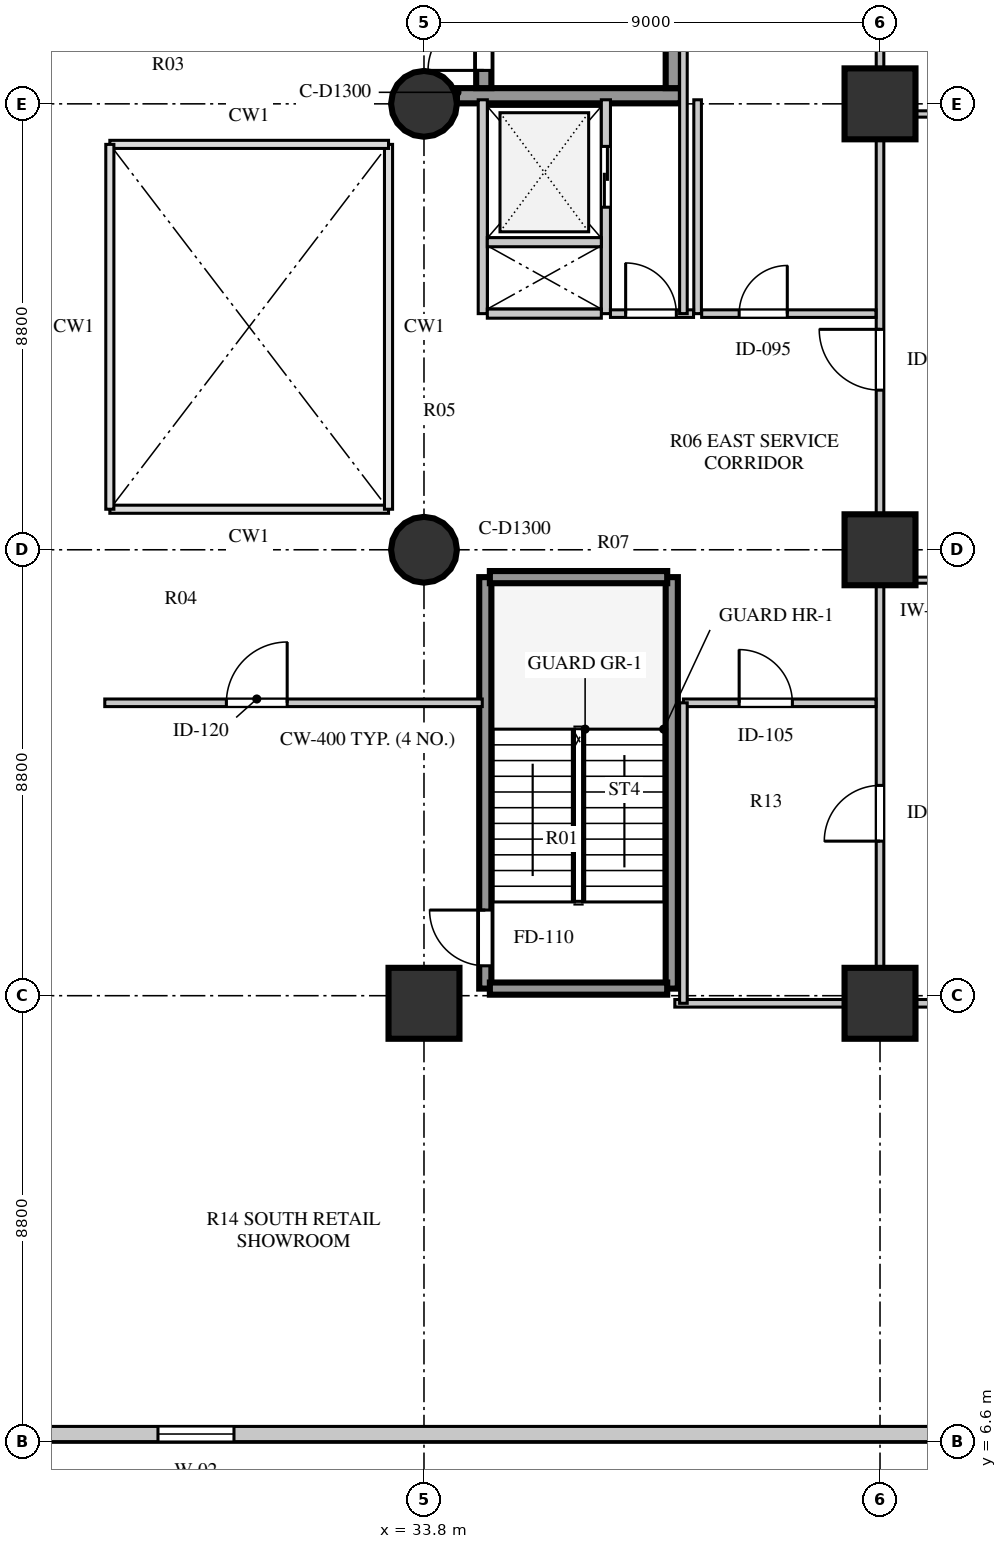
"""IFC4 building model, lengths in metres.
Left out: names, types, materials, properties, quantities, classifications, styles, units other than length and angle.
Written with IfcOpenShell. Run it as: python <this file> out.ifc"""

import sys

from ifc_helpers import new_model, si_unit, direction, frame, frame_2d, origin, origin_2d, place, context, subcontext, project, spatial, rectangle, circle, extrude, element, fill, save


model = new_model("IFC4")
c1 = context("Model", 3, precision=1e-05, world=origin(), true_north=direction((0.0, 1.0)))
c2 = subcontext(c1, "Body", "Model", "MODEL_VIEW")
j1 = project(units=[si_unit("LENGTHUNIT", "METRE"), si_unit("PLANEANGLEUNIT", "RADIAN")], contexts=[c1])
p1 = place(None, origin())
s1 = spatial("IfcSite", under=j1, at=p1, CompositionType="ELEMENT")
p2 = place(p1, origin())
s2 = spatial("IfcBuilding", under=s1, at=p2, CompositionType="ELEMENT")
p3 = place(p2, frame((0.0, 0.0, 8.0)))
s3 = spatial("IfcBuildingStorey", under=s2, at=p3, CompositionType="ELEMENT", Elevation=8.0)
p4 = place(p3, frame((34.45, 33.16, 0.0), z_axis=(0.0, 0.0, 1.0), x_axis=(1.0, 0.0, 0.0)))
e1 = element("IfcWall", 1, at=p4, inside=s3, PredefinedType="SHEAR", context=c2, shape_type="SweptSolid", body=[
    extrude(rectangle(XDim=4.42, YDim=0.3, at=frame_2d((2.21, 0.0))), origin(), (0.0, 0.0, 1.0), 4.22),
])
p5 = place(p3, frame((34.98, 33.31, 0.0), z_axis=(0.0, 0.0, 1.0), x_axis=(0.0, 1.0, 0.0)))
e2 = element("IfcWall", 2, at=p5, inside=s3, PredefinedType="SHEAR", context=c2, shape_type="SweptSolid", body=[
    extrude(rectangle(XDim=8.03, YDim=0.3, at=frame_2d((4.015, 0.0))), origin(), (0.0, 0.0, 1.0), 4.22),
])
p6 = place(p5, frame((0.35, 0.0, 0.0)))
e3 = element("IfcOpeningElement", 3, at=p6, cuts=e2, PredefinedType="OPENING", context=c2, shape_type="SweptSolid", body=[
    extrude(rectangle(XDim=1.1, YDim=2.1, at=frame_2d((0.55, 1.05))), frame((0.0, 0.16, 0.0), z_axis=(0.0, -1.0, 0.0), x_axis=(1.0, 0.0, 0.0)), (0.0, 0.0, 1.0), 0.32),
])
p7 = place(p3, frame((38.72, 33.31, 0.0), z_axis=(0.0, 0.0, 1.0), x_axis=(0.0, 1.0, 0.0)))
e4 = element("IfcWall", 4, at=p7, inside=s3, PredefinedType="SHEAR", context=c2, shape_type="SweptSolid", body=[
    extrude(rectangle(XDim=8.03, YDim=0.3, at=frame_2d((4.015, 0.0))), origin(), (0.0, 0.0, 1.0), 4.22),
])
p8 = place(p3, frame((33.8, 15.25, 0.0), z_axis=(0.0, 0.0, 1.0), x_axis=(1.0, 0.0, 0.0)))
e5 = element("IfcColumn", 5, at=p8, inside=s3, PredefinedType="COLUMN", context=c2, shape_type="SweptSolid", body=[
    extrude(rectangle(XDim=1.4, YDim=1.4, at=origin_2d()), origin(), (0.0, 0.0, 1.0), 4.22),
])
for number, where, z_axis, x_axis in (
    (6, (33.8, 24.2, 0.0), (0.0, 0.0, 1.0), (1.0, 0.0, 0.0)),
    (7, (33.8, 33.0, 0.0), (0.0, 0.0, 1.0), (1.0, 0.0, 0.0)),
):
    element("IfcColumn", number, at=place(p3, frame(where, z_axis=z_axis, x_axis=x_axis)), inside=s3, PredefinedType="COLUMN", context=c2, shape_type="SweptSolid", body=[
        extrude(circle(Radius=0.65, at=origin_2d()), origin(), (0.0, 0.0, 1.0), 4.22),
    ])
for number, where, z_axis, x_axis in (
    (8, (42.8, 15.25, 0.0), (0.0, 0.0, 1.0), (1.0, 0.0, 0.0)),
    (9, (42.8, 24.2, 0.0), (0.0, 0.0, 1.0), (1.0, 0.0, 0.0)),
    (10, (42.8, 33.0, 0.0), (0.0, 0.0, 1.0), (1.0, 0.0, 0.0)),
):
    element("IfcColumn", number, at=place(p3, frame(where, z_axis=z_axis, x_axis=x_axis)), inside=s3, PredefinedType="COLUMN", context=c2, shape_type="SweptSolid", body=[
        extrude(rectangle(XDim=1.4, YDim=1.4, at=origin_2d()), origin(), (0.0, 0.0, 1.0), 4.22),
    ])
p9 = place(p3, frame((12.3, 6.75, 0.0), z_axis=(0.0, 0.0, 1.0), x_axis=(1.0, 0.0, 0.0)))
e11 = element("IfcWall", 11, at=p9, inside=s3, PredefinedType="STANDARD", context=c2, shape_type="SweptSolid", body=[
    extrude(rectangle(XDim=34.0, YDim=0.3, at=frame_2d((17.0, 0.0))), origin(), (0.0, 0.0, 1.0), 4.22),
])
p10 = place(p9, frame((16.25, 0.0, 0.8)))
e12 = element("IfcOpeningElement", 12, at=p10, cuts=e11, PredefinedType="OPENING", context=c2, shape_type="SweptSolid", body=[
    extrude(rectangle(XDim=1.5, YDim=2.0, at=frame_2d((0.75, 1.0))), frame((0.0, 0.16, 0.0), z_axis=(0.0, -1.0, 0.0), x_axis=(1.0, 0.0, 0.0)), (0.0, 0.0, 1.0), 0.32),
])
p11 = place(p3, frame((34.96, 28.86, 0.0), z_axis=(0.0, 0.0, 1.0), x_axis=(0.0, 1.0, 0.0)))
e13 = element("IfcWall", 13, at=p11, inside=s3, PredefinedType="SOLIDWALL", context=c2, shape_type="SweptSolid", body=[
    extrude(rectangle(XDim=4.22, YDim=0.18, at=frame_2d((2.11, 0.0))), origin(), (0.0, 0.0, 1.0), 4.22),
])
p12 = place(p3, frame((37.39, 28.86, 0.0), z_axis=(0.0, 0.0, 1.0), x_axis=(0.0, 1.0, 0.0)))
e14 = element("IfcWall", 14, at=p12, inside=s3, PredefinedType="SOLIDWALL", context=c2, shape_type="SweptSolid", body=[
    extrude(rectangle(XDim=4.22, YDim=0.18, at=frame_2d((2.11, 0.0))), origin(), (0.0, 0.0, 1.0), 4.22),
])
p13 = place(p12, frame((2.1, 0.0, 0.0)))
e15 = element("IfcOpeningElement", 15, at=p13, cuts=e14, PredefinedType="OPENING", context=c2, shape_type="SweptSolid", body=[
    extrude(rectangle(XDim=1.2, YDim=2.12, at=frame_2d((0.6, 1.06))), frame((0.0, 0.1, 0.0), z_axis=(0.0, -1.0, 0.0), x_axis=(1.0, 0.0, 0.0)), (0.0, 0.0, 1.0), 0.2),
])
for number, where, z_axis, x_axis in (
    (16, (35.05, 28.86, 0.0), (0.0, 0.0, 1.0), (1.0, 0.0, 0.0)),
    (17, (35.05, 30.27, 0.0), (0.0, 0.0, 1.0), (1.0, 0.0, 0.0)),
):
    element("IfcWall", number, at=place(p3, frame(where, z_axis=z_axis, x_axis=x_axis)), inside=s3, PredefinedType="SOLIDWALL", context=c2, shape_type="SweptSolid", body=[
        extrude(rectangle(XDim=2.25, YDim=0.18, at=frame_2d((1.125, 0.0))), origin(), (0.0, 0.0, 1.0), 4.22),
    ])
p14 = place(p3, frame((39.2, 28.86, 0.0), z_axis=(0.0, 0.0, 1.0), x_axis=(0.0, 1.0, 0.0)))
e18 = element("IfcWall", 18, at=p14, inside=s3, PredefinedType="PARTITIONING", context=c2, shape_type="SweptSolid", body=[
    extrude(rectangle(XDim=4.22, YDim=0.15, at=frame_2d((2.11, 0.0))), origin(), (0.0, 0.0, 1.0), 4.22),
])
p15 = place(p3, frame((37.48, 28.86, 0.0), z_axis=(0.0, 0.0, 1.0), x_axis=(1.0, 0.0, 0.0)))
e19 = element("IfcWall", 19, at=p15, inside=s3, PredefinedType="PARTITIONING", context=c2, shape_type="SweptSolid", body=[
    extrude(rectangle(XDim=1.64, YDim=0.15, at=frame_2d((0.82, 0.0))), origin(), (0.0, 0.0, 1.0), 4.22),
])
p16 = place(p15, frame((0.3, 0.0, 0.0)))
e20 = element("IfcOpeningElement", 20, at=p16, cuts=e19, PredefinedType="OPENING", context=c2, shape_type="SweptSolid", body=[
    extrude(rectangle(XDim=1.0, YDim=2.1, at=frame_2d((0.5, 1.05))), frame((0.0, 0.085, 0.0), z_axis=(0.0, -1.0, 0.0), x_axis=(1.0, 0.0, 0.0)), (0.0, 0.0, 1.0), 0.17),
])
p17 = place(p3, frame((35.01, 15.54, 0.0), z_axis=(0.0, 0.0, 1.0), x_axis=(0.0, 1.0, 0.0)))
e21 = element("IfcWall", 21, at=p17, inside=s3, PredefinedType="SHEAR", context=c2, shape_type="SweptSolid", body=[
    extrude(rectangle(XDim=8.12, YDim=0.24, at=frame_2d((4.06, 0.0))), origin(), (0.0, 0.0, 1.0), 4.5),
])
p18 = place(p17, frame((0.45, 0.0, 0.0)))
e22 = element("IfcOpeningElement", 22, at=p18, cuts=e21, PredefinedType="OPENING", context=c2, shape_type="SweptSolid", body=[
    extrude(rectangle(XDim=1.1, YDim=2.1, at=frame_2d((0.55, 1.05))), frame((0.0, 0.13, 0.0), z_axis=(0.0, -1.0, 0.0), x_axis=(1.0, 0.0, 0.0)), (0.0, 0.0, 1.0), 0.26),
])
p19 = place(p3, frame((38.69, 15.54, 0.0), z_axis=(0.0, 0.0, 1.0), x_axis=(0.0, 1.0, 0.0)))
e23 = element("IfcWall", 23, at=p19, inside=s3, PredefinedType="SHEAR", context=c2, shape_type="SweptSolid", body=[
    extrude(rectangle(XDim=8.12, YDim=0.24, at=frame_2d((4.06, 0.0))), origin(), (0.0, 0.0, 1.0), 4.5),
])
for number, where, z_axis, x_axis in (
    (24, (35.1, 15.54, 0.0), (0.0, 0.0, 1.0), (1.0, 0.0, 0.0)),
    (25, (35.1, 23.66, 0.0), (0.0, 0.0, 1.0), (1.0, 0.0, 0.0)),
):
    element("IfcWall", number, at=place(p3, frame(where, z_axis=z_axis, x_axis=x_axis)), inside=s3, PredefinedType="SHEAR", context=c2, shape_type="SweptSolid", body=[
        extrude(rectangle(XDim=3.5, YDim=0.24, at=frame_2d((1.75, 0.0))), origin(), (0.0, 0.0, 1.0), 4.5),
    ])
p20 = place(p3, frame((27.5, 21.18, 0.0), z_axis=(0.0, 0.0, 1.0), x_axis=(1.0, 0.0, 0.0)))
e26 = element("IfcWall", 26, at=p20, inside=s3, PredefinedType="PARTITIONING", context=c2, shape_type="SweptSolid", body=[
    extrude(rectangle(XDim=7.45, YDim=0.15, at=frame_2d((3.725, 0.0))), origin(), (0.0, 0.0, 1.0), 3.82),
])
p21 = place(p20, frame((2.4, 0.0, 0.0)))
e27 = element("IfcOpeningElement", 27, at=p21, cuts=e26, PredefinedType="OPENING", context=c2, shape_type="SweptSolid", body=[
    extrude(rectangle(XDim=1.2, YDim=2.1, at=frame_2d((0.6, 1.05))), frame((0.0, 0.085, 0.0), z_axis=(0.0, -1.0, 0.0), x_axis=(1.0, 0.0, 0.0)), (0.0, 0.0, 1.0), 0.17),
])
p22 = place(p3, frame((42.8, 15.25, 0.0), z_axis=(0.0, 0.0, 1.0), x_axis=(0.0, 1.0, 0.0)))
e28 = element("IfcWall", 28, at=p22, inside=s3, PredefinedType="PARTITIONING", context=c2, shape_type="SweptSolid", body=[
    extrude(rectangle(XDim=26.7, YDim=0.15, at=frame_2d((13.35, 0.0))), origin(), (0.0, 0.0, 1.0), 3.42),
])
p23 = place(p22, frame((3.2, 0.0, 0.0)))
e29 = element("IfcOpeningElement", 29, at=p23, cuts=e28, PredefinedType="OPENING", context=c2, shape_type="SweptSolid", body=[
    extrude(rectangle(XDim=1.1, YDim=2.08, at=frame_2d((0.55, 1.04))), frame((0.0, 0.085, 0.0), z_axis=(0.0, -1.0, 0.0), x_axis=(1.0, 0.0, 0.0)), (0.0, 0.0, 1.0), 0.17),
])
p24 = place(p22, frame((12.1, 0.0, 0.0)))
e30 = element("IfcOpeningElement", 30, at=p24, cuts=e28, PredefinedType="OPENING", context=c2, shape_type="SweptSolid", body=[
    extrude(rectangle(XDim=1.2, YDim=2.1, at=frame_2d((0.6, 1.05))), frame((0.0, 0.085, 0.0), z_axis=(0.0, -1.0, 0.0), x_axis=(1.0, 0.0, 0.0)), (0.0, 0.0, 1.0), 0.17),
])
p25 = place(p22, frame((20.0, 0.0, 0.0)))
e31 = element("IfcOpeningElement", 31, at=p25, cuts=e28, PredefinedType="OPENING", context=c2, shape_type="SweptSolid", body=[
    extrude(rectangle(XDim=0.9, YDim=2.05, at=frame_2d((0.45, 1.025))), frame((0.0, 0.085, 0.0), z_axis=(0.0, -1.0, 0.0), x_axis=(1.0, 0.0, 0.0)), (0.0, 0.0, 1.0), 0.17),
])
p26 = place(p22, frame((23.8, 0.0, 0.0)))
e32 = element("IfcOpeningElement", 32, at=p26, cuts=e28, PredefinedType="OPENING", context=c2, shape_type="SweptSolid", body=[
    extrude(rectangle(XDim=0.95, YDim=2.05, at=frame_2d((0.475, 1.025))), frame((0.0, 0.085, 0.0), z_axis=(0.0, -1.0, 0.0), x_axis=(1.0, 0.0, 0.0)), (0.0, 0.0, 1.0), 0.17),
])
p27 = place(p3, frame((38.75, 15.25, 0.0), z_axis=(0.0, 0.0, 1.0), x_axis=(1.0, 0.0, 0.0)))
e33 = element("IfcWall", 33, at=p27, inside=s3, PredefinedType="PARTITIONING", context=c2, shape_type="SweptSolid", body=[
    extrude(rectangle(XDim=12.7, YDim=0.15, at=frame_2d((6.35, 0.0))), origin(), (0.0, 0.0, 1.0), 3.42),
])
p28 = place(p3, frame((38.92, 21.18, 0.0), z_axis=(0.0, 0.0, 1.0), x_axis=(1.0, 0.0, 0.0)))
e34 = element("IfcWall", 34, at=p28, inside=s3, PredefinedType="PARTITIONING", context=c2, shape_type="SweptSolid", body=[
    extrude(rectangle(XDim=3.8, YDim=0.15, at=frame_2d((1.9, 0.0))), origin(), (0.0, 0.0, 1.0), 4.22),
])
p29 = place(p28, frame((1.1, 0.0, 0.0)))
e35 = element("IfcOpeningElement", 35, at=p29, cuts=e34, PredefinedType="OPENING", context=c2, shape_type="SweptSolid", body=[
    extrude(rectangle(XDim=1.05, YDim=2.1, at=frame_2d((0.525, 1.05))), frame((0.0, 0.085, 0.0), z_axis=(0.0, -1.0, 0.0), x_axis=(1.0, 0.0, 0.0)), (0.0, 0.0, 1.0), 0.17),
])
p30 = place(p3, frame((38.92, 15.25, 0.0), z_axis=(0.0, 0.0, 1.0), x_axis=(0.0, 1.0, 0.0)))
e36 = element("IfcWall", 36, at=p30, inside=s3, PredefinedType="PARTITIONING", context=c2, shape_type="SweptSolid", body=[
    extrude(rectangle(XDim=5.93, YDim=0.15, at=frame_2d((2.965, 0.0))), origin(), (0.0, 0.0, 1.0), 4.22),
])
p31 = place(p3, frame((39.28, 28.86, 0.0), z_axis=(0.0, 0.0, 1.0), x_axis=(1.0, 0.0, 0.0)))
e37 = element("IfcWall", 37, at=p31, inside=s3, PredefinedType="PARTITIONING", context=c2, shape_type="SweptSolid", body=[
    extrude(rectangle(XDim=3.44, YDim=0.15, at=frame_2d((1.72, 0.0))), origin(), (0.0, 0.0, 1.0), 4.22),
])
p32 = place(p31, frame((0.74, 0.0, 0.0)))
e38 = element("IfcOpeningElement", 38, at=p32, cuts=e37, PredefinedType="OPENING", context=c2, shape_type="SweptSolid", body=[
    extrude(rectangle(XDim=0.95, YDim=2.08, at=frame_2d((0.475, 1.04))), frame((0.0, 0.085, 0.0), z_axis=(0.0, -1.0, 0.0), x_axis=(1.0, 0.0, 0.0)), (0.0, 0.0, 1.0), 0.17),
])
p33 = place(p3, frame((38.92, 28.86, 0.0), z_axis=(0.0, 0.0, 1.0), x_axis=(0.0, 1.0, 0.0)))
e39 = element("IfcWall", 39, at=p33, inside=s3, PredefinedType="PARTITIONING", context=c2, shape_type="SweptSolid", body=[
    extrude(rectangle(XDim=13.09, YDim=0.15, at=frame_2d((6.545, 0.0))), origin(), (0.0, 0.0, 1.0), 4.22),
])
p34 = place(p3, frame((42.88, 23.6, 0.0), z_axis=(0.0, 0.0, 1.0), x_axis=(1.0, 0.0, 0.0)))
e40 = element("IfcWall", 40, at=p34, inside=s3, PredefinedType="PARTITIONING", context=c2, shape_type="SweptSolid", body=[
    extrude(rectangle(XDim=8.57, YDim=0.12, at=frame_2d((4.285, 0.0))), origin(), (0.0, 0.0, 1.0), 4.22),
])
p35 = place(p3, frame((42.88, 32.8, 0.0), z_axis=(0.0, 0.0, 1.0), x_axis=(1.0, 0.0, 0.0)))
e41 = element("IfcWall", 41, at=p35, inside=s3, PredefinedType="PLUMBINGWALL", context=c2, shape_type="SweptSolid", body=[
    extrude(rectangle(XDim=8.57, YDim=0.125, at=frame_2d((4.285, 0.0))), origin(), (0.0, 0.0, 1.0), 3.72),
])
p36 = place(p10, origin())
e42 = element("IfcWindow", 42, at=p36, inside=s3, PartitioningType="SINGLE_PANEL", PredefinedType="WINDOW", context=c2, shape_type="SweptSolid", body=[
    extrude(rectangle(XDim=1.5, YDim=2.0, at=frame_2d((0.75, 1.0))), frame((0.0, 0.03, 0.0), z_axis=(0.0, -1.0, 0.0), x_axis=(1.0, 0.0, 0.0)), (0.0, 0.0, 1.0), 0.06),
])
fill(e12, e42)
p37 = place(p6, origin())
e43 = element("IfcDoor", 43, at=p37, inside=s3, OperationType="SINGLE_SWING_LEFT", PredefinedType="DOOR", context=c2, shape_type="SweptSolid", body=[
    extrude(rectangle(XDim=1.1, YDim=2.1, at=frame_2d((0.55, 1.05))), frame((0.0, 0.025, 0.0), z_axis=(0.0, -1.0, 0.0), x_axis=(1.0, 0.0, 0.0)), (0.0, 0.0, 1.0), 0.05),
])
fill(e3, e43)
p38 = place(p13, frame((1.2, 0.0, 0.0), z_axis=(0.0, 0.0, 1.0), x_axis=(-1.0, 0.0, 0.0)))
e44 = element("IfcDoor", 44, at=p38, inside=s3, OperationType="DOUBLE_DOOR_SLIDING", PredefinedType="DOOR", context=c2, shape_type="SweptSolid", body=[
    extrude(rectangle(XDim=1.2, YDim=2.12, at=frame_2d((0.6, 1.06))), frame((0.0, 0.025, 0.0), z_axis=(0.0, -1.0, 0.0), x_axis=(1.0, 0.0, 0.0)), (0.0, 0.0, 1.0), 0.05),
])
fill(e15, e44)
p39 = place(p16, origin())
e45 = element("IfcDoor", 45, at=p39, inside=s3, OperationType="SINGLE_SWING_LEFT", PredefinedType="DOOR", context=c2, shape_type="SweptSolid", body=[
    extrude(rectangle(XDim=1.0, YDim=2.1, at=frame_2d((0.5, 1.05))), frame((0.0, 0.025, 0.0), z_axis=(0.0, -1.0, 0.0), x_axis=(1.0, 0.0, 0.0)), (0.0, 0.0, 1.0), 0.05),
])
fill(e20, e45)
p40 = place(p18, origin())
e46 = element("IfcDoor", 46, at=p40, inside=s3, OperationType="SINGLE_SWING_RIGHT", PredefinedType="DOOR", context=c2, shape_type="SweptSolid", body=[
    extrude(rectangle(XDim=1.1, YDim=2.1, at=frame_2d((0.55, 1.05))), frame((0.0, 0.025, 0.0), z_axis=(0.0, -1.0, 0.0), x_axis=(1.0, 0.0, 0.0)), (0.0, 0.0, 1.0), 0.05),
])
fill(e22, e46)
p41 = place(p29, origin())
e47 = element("IfcDoor", 47, at=p41, inside=s3, OperationType="SINGLE_SWING_LEFT", PredefinedType="DOOR", context=c2, shape_type="SweptSolid", body=[
    extrude(rectangle(XDim=1.05, YDim=2.1, at=frame_2d((0.525, 1.05))), frame((0.0, 0.025, 0.0), z_axis=(0.0, -1.0, 0.0), x_axis=(1.0, 0.0, 0.0)), (0.0, 0.0, 1.0), 0.05),
])
fill(e35, e47)
p42 = place(p32, frame((0.95, 0.0, 0.0), z_axis=(0.0, 0.0, 1.0), x_axis=(-1.0, 0.0, 0.0)))
e48 = element("IfcDoor", 48, at=p42, inside=s3, OperationType="SINGLE_SWING_LEFT", PredefinedType="DOOR", context=c2, shape_type="SweptSolid", body=[
    extrude(rectangle(XDim=0.95, YDim=2.08, at=frame_2d((0.475, 1.04))), frame((0.0, 0.025, 0.0), z_axis=(0.0, -1.0, 0.0), x_axis=(1.0, 0.0, 0.0)), (0.0, 0.0, 1.0), 0.05),
])
fill(e38, e48)
p43 = place(p21, frame((1.2, 0.0, 0.0), z_axis=(0.0, 0.0, 1.0), x_axis=(-1.0, 0.0, 0.0)))
e49 = element("IfcDoor", 49, at=p43, inside=s3, OperationType="SINGLE_SWING_LEFT", PredefinedType="DOOR", context=c2, shape_type="SweptSolid", body=[
    extrude(rectangle(XDim=1.2, YDim=2.1, at=frame_2d((0.6, 1.05))), frame((0.0, 0.025, 0.0), z_axis=(0.0, -1.0, 0.0), x_axis=(1.0, 0.0, 0.0)), (0.0, 0.0, 1.0), 0.05),
])
fill(e27, e49)
p44 = place(p23, origin())
e50 = element("IfcDoor", 50, at=p44, inside=s3, OperationType="SINGLE_SWING_LEFT", PredefinedType="DOOR", context=c2, shape_type="SweptSolid", body=[
    extrude(rectangle(XDim=1.1, YDim=2.08, at=frame_2d((0.55, 1.04))), frame((0.0, 0.025, 0.0), z_axis=(0.0, -1.0, 0.0), x_axis=(1.0, 0.0, 0.0)), (0.0, 0.0, 1.0), 0.05),
])
fill(e29, e50)
p45 = place(p24, origin())
e51 = element("IfcDoor", 51, at=p45, inside=s3, OperationType="SINGLE_SWING_RIGHT", PredefinedType="DOOR", context=c2, shape_type="SweptSolid", body=[
    extrude(rectangle(XDim=1.2, YDim=2.1, at=frame_2d((0.6, 1.05))), frame((0.0, 0.025, 0.0), z_axis=(0.0, -1.0, 0.0), x_axis=(1.0, 0.0, 0.0)), (0.0, 0.0, 1.0), 0.05),
])
fill(e30, e51)
save(model, sys.argv[1])
